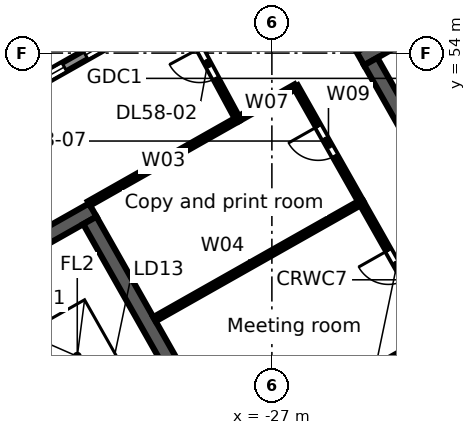
"""IFC4 building model, lengths in metres.
Left out: names, types, materials, properties, quantities, classifications, styles, units other than length and angle.
Written with IfcOpenShell. Run it as: python <this file> out.ifc"""

import sys

from ifc_helpers import new_model, si_unit, direction, frame, frame_2d, origin, place, context, subcontext, project, spatial, rectangle, extrude, element, fill, save


model = new_model("IFC4")
c1 = context("Model", 3, precision=1e-05, world=origin(), true_north=direction((0.0, 1.0)))
c2 = subcontext(c1, "Body", "Model", "MODEL_VIEW")
j1 = project(units=[si_unit("LENGTHUNIT", "METRE"), si_unit("PLANEANGLEUNIT", "RADIAN")], contexts=[c1])
p1 = place(None, origin())
s1 = spatial("IfcSite", under=j1, at=p1, CompositionType="ELEMENT")
p2 = place(p1, origin())
s2 = spatial("IfcBuilding", under=s1, at=p2, CompositionType="ELEMENT")
p3 = place(p2, frame((0.0, 0.0, 266.5)))
s3 = spatial("IfcBuildingStorey", under=s2, at=p3, CompositionType="ELEMENT", Elevation=266.5)
p4 = place(p3, frame((-58.732, 38.771, 0.0), z_axis=(0.0, 0.0, 1.0), x_axis=(0.870355615581, 0.492423702137, 0.0)))
e1 = element("IfcWall", 1, at=p4, inside=s3, PredefinedType="STANDARD", context=c2, shape_type="SweptSolid", body=[
    extrude(rectangle(XDim=64.052, YDim=0.25, at=frame_2d((32.026, 0.0))), origin(), (0.0, 0.0, 1.0), 3.52),
])
p5 = place(p4, frame((61.259, 0.0, 0.8)))
e2 = element("IfcOpeningElement", 2, at=p5, cuts=e1, PredefinedType="OPENING", context=c2, shape_type="SweptSolid", body=[
    extrude(rectangle(XDim=2.4, YDim=2.2, at=frame_2d((1.2, 1.1))), frame((0.0, 0.135, 0.0), z_axis=(0.0, -1.0, 0.0), x_axis=(1.0, 0.0, 0.0)), (0.0, 0.0, 1.0), 0.27),
])
p6 = place(p4, frame((58.216, 0.0, 0.8)))
e3 = element("IfcOpeningElement", 3, at=p6, cuts=e1, PredefinedType="OPENING", context=c2, shape_type="SweptSolid", body=[
    extrude(rectangle(XDim=2.4, YDim=2.2, at=frame_2d((1.2, 1.1))), frame((0.0, 0.135, 0.0), z_axis=(0.0, -1.0, 0.0), x_axis=(1.0, 0.0, 0.0)), (0.0, 0.0, 1.0), 0.27),
])
p7 = place(p4, frame((55.173, 0.0, 0.8)))
e4 = element("IfcOpeningElement", 4, at=p7, cuts=e1, PredefinedType="OPENING", context=c2, shape_type="SweptSolid", body=[
    extrude(rectangle(XDim=2.4, YDim=2.2, at=frame_2d((1.2, 1.1))), frame((0.0, 0.135, 0.0), z_axis=(0.0, -1.0, 0.0), x_axis=(1.0, 0.0, 0.0)), (0.0, 0.0, 1.0), 0.27),
])
p8 = place(p4, frame((52.129, 0.0, 0.8)))
e5 = element("IfcOpeningElement", 5, at=p8, cuts=e1, PredefinedType="OPENING", context=c2, shape_type="SweptSolid", body=[
    extrude(rectangle(XDim=2.4, YDim=2.2, at=frame_2d((1.2, 1.1))), frame((0.0, 0.135, 0.0), z_axis=(0.0, -1.0, 0.0), x_axis=(1.0, 0.0, 0.0)), (0.0, 0.0, 1.0), 0.27),
])
p9 = place(p4, frame((49.086, 0.0, 0.8)))
e6 = element("IfcOpeningElement", 6, at=p9, cuts=e1, PredefinedType="OPENING", context=c2, shape_type="SweptSolid", body=[
    extrude(rectangle(XDim=2.4, YDim=2.2, at=frame_2d((1.2, 1.1))), frame((0.0, 0.135, 0.0), z_axis=(0.0, -1.0, 0.0), x_axis=(1.0, 0.0, 0.0)), (0.0, 0.0, 1.0), 0.27),
])
p10 = place(p4, frame((46.043, 0.0, 0.8)))
e7 = element("IfcOpeningElement", 7, at=p10, cuts=e1, PredefinedType="OPENING", context=c2, shape_type="SweptSolid", body=[
    extrude(rectangle(XDim=2.4, YDim=2.2, at=frame_2d((1.2, 1.1))), frame((0.0, 0.135, 0.0), z_axis=(0.0, -1.0, 0.0), x_axis=(1.0, 0.0, 0.0)), (0.0, 0.0, 1.0), 0.27),
])
p11 = place(p4, frame((43.0, 0.0, 0.8)))
e8 = element("IfcOpeningElement", 8, at=p11, cuts=e1, PredefinedType="OPENING", context=c2, shape_type="SweptSolid", body=[
    extrude(rectangle(XDim=2.4, YDim=2.2, at=frame_2d((1.2, 1.1))), frame((0.0, 0.135, 0.0), z_axis=(0.0, -1.0, 0.0), x_axis=(1.0, 0.0, 0.0)), (0.0, 0.0, 1.0), 0.27),
])
p12 = place(p4, frame((39.956, 0.0, 0.8)))
e9 = element("IfcOpeningElement", 9, at=p12, cuts=e1, PredefinedType="OPENING", context=c2, shape_type="SweptSolid", body=[
    extrude(rectangle(XDim=2.4, YDim=2.2, at=frame_2d((1.2, 1.1))), frame((0.0, 0.135, 0.0), z_axis=(0.0, -1.0, 0.0), x_axis=(1.0, 0.0, 0.0)), (0.0, 0.0, 1.0), 0.27),
])
p13 = place(p4, frame((36.913, 0.0, 0.8)))
e10 = element("IfcOpeningElement", 10, at=p13, cuts=e1, PredefinedType="OPENING", context=c2, shape_type="SweptSolid", body=[
    extrude(rectangle(XDim=2.4, YDim=2.2, at=frame_2d((1.2, 1.1))), frame((0.0, 0.135, 0.0), z_axis=(0.0, -1.0, 0.0), x_axis=(1.0, 0.0, 0.0)), (0.0, 0.0, 1.0), 0.27),
])
p14 = place(p4, frame((33.87, 0.0, 0.8)))
e11 = element("IfcOpeningElement", 11, at=p14, cuts=e1, PredefinedType="OPENING", context=c2, shape_type="SweptSolid", body=[
    extrude(rectangle(XDim=2.4, YDim=2.2, at=frame_2d((1.2, 1.1))), frame((0.0, 0.135, 0.0), z_axis=(0.0, -1.0, 0.0), x_axis=(1.0, 0.0, 0.0)), (0.0, 0.0, 1.0), 0.27),
])
p15 = place(p4, frame((30.826, 0.0, 0.8)))
e12 = element("IfcOpeningElement", 12, at=p15, cuts=e1, PredefinedType="OPENING", context=c2, shape_type="SweptSolid", body=[
    extrude(rectangle(XDim=2.4, YDim=2.2, at=frame_2d((1.2, 1.1))), frame((0.0, 0.135, 0.0), z_axis=(0.0, -1.0, 0.0), x_axis=(1.0, 0.0, 0.0)), (0.0, 0.0, 1.0), 0.27),
])
p16 = place(p4, frame((27.783, 0.0, 0.8)))
e13 = element("IfcOpeningElement", 13, at=p16, cuts=e1, PredefinedType="OPENING", context=c2, shape_type="SweptSolid", body=[
    extrude(rectangle(XDim=2.4, YDim=2.2, at=frame_2d((1.2, 1.1))), frame((0.0, 0.135, 0.0), z_axis=(0.0, -1.0, 0.0), x_axis=(1.0, 0.0, 0.0)), (0.0, 0.0, 1.0), 0.27),
])
p17 = place(p4, frame((24.74, 0.0, 0.8)))
e14 = element("IfcOpeningElement", 14, at=p17, cuts=e1, PredefinedType="OPENING", context=c2, shape_type="SweptSolid", body=[
    extrude(rectangle(XDim=2.4, YDim=2.2, at=frame_2d((1.2, 1.1))), frame((0.0, 0.135, 0.0), z_axis=(0.0, -1.0, 0.0), x_axis=(1.0, 0.0, 0.0)), (0.0, 0.0, 1.0), 0.27),
])
p18 = place(p4, frame((21.696, 0.0, 0.8)))
e15 = element("IfcOpeningElement", 15, at=p18, cuts=e1, PredefinedType="OPENING", context=c2, shape_type="SweptSolid", body=[
    extrude(rectangle(XDim=2.4, YDim=2.2, at=frame_2d((1.2, 1.1))), frame((0.0, 0.135, 0.0), z_axis=(0.0, -1.0, 0.0), x_axis=(1.0, 0.0, 0.0)), (0.0, 0.0, 1.0), 0.27),
])
p19 = place(p4, frame((18.653, 0.0, 0.8)))
e16 = element("IfcOpeningElement", 16, at=p19, cuts=e1, PredefinedType="OPENING", context=c2, shape_type="SweptSolid", body=[
    extrude(rectangle(XDim=2.4, YDim=2.2, at=frame_2d((1.2, 1.1))), frame((0.0, 0.135, 0.0), z_axis=(0.0, -1.0, 0.0), x_axis=(1.0, 0.0, 0.0)), (0.0, 0.0, 1.0), 0.27),
])
p20 = place(p4, frame((15.61, 0.0, 0.8)))
e17 = element("IfcOpeningElement", 17, at=p20, cuts=e1, PredefinedType="OPENING", context=c2, shape_type="SweptSolid", body=[
    extrude(rectangle(XDim=2.4, YDim=2.2, at=frame_2d((1.2, 1.1))), frame((0.0, 0.135, 0.0), z_axis=(0.0, -1.0, 0.0), x_axis=(1.0, 0.0, 0.0)), (0.0, 0.0, 1.0), 0.27),
])
p21 = place(p4, frame((12.567, 0.0, 0.8)))
e18 = element("IfcOpeningElement", 18, at=p21, cuts=e1, PredefinedType="OPENING", context=c2, shape_type="SweptSolid", body=[
    extrude(rectangle(XDim=2.4, YDim=2.2, at=frame_2d((1.2, 1.1))), frame((0.0, 0.135, 0.0), z_axis=(0.0, -1.0, 0.0), x_axis=(1.0, 0.0, 0.0)), (0.0, 0.0, 1.0), 0.27),
])
p22 = place(p4, frame((9.523, 0.0, 0.8)))
e19 = element("IfcOpeningElement", 19, at=p22, cuts=e1, PredefinedType="OPENING", context=c2, shape_type="SweptSolid", body=[
    extrude(rectangle(XDim=2.4, YDim=2.2, at=frame_2d((1.2, 1.1))), frame((0.0, 0.135, 0.0), z_axis=(0.0, -1.0, 0.0), x_axis=(1.0, 0.0, 0.0)), (0.0, 0.0, 1.0), 0.27),
])
p23 = place(p4, frame((6.48, 0.0, 0.8)))
e20 = element("IfcOpeningElement", 20, at=p23, cuts=e1, PredefinedType="OPENING", context=c2, shape_type="SweptSolid", body=[
    extrude(rectangle(XDim=2.4, YDim=2.2, at=frame_2d((1.2, 1.1))), frame((0.0, 0.135, 0.0), z_axis=(0.0, -1.0, 0.0), x_axis=(1.0, 0.0, 0.0)), (0.0, 0.0, 1.0), 0.27),
])
p24 = place(p4, frame((3.437, 0.0, 0.8)))
e21 = element("IfcOpeningElement", 21, at=p24, cuts=e1, PredefinedType="OPENING", context=c2, shape_type="SweptSolid", body=[
    extrude(rectangle(XDim=2.4, YDim=2.2, at=frame_2d((1.2, 1.1))), frame((0.0, 0.135, 0.0), z_axis=(0.0, -1.0, 0.0), x_axis=(1.0, 0.0, 0.0)), (0.0, 0.0, 1.0), 0.27),
])
p25 = place(p4, frame((0.393, 0.0, 0.8)))
e22 = element("IfcOpeningElement", 22, at=p25, cuts=e1, PredefinedType="OPENING", context=c2, shape_type="SweptSolid", body=[
    extrude(rectangle(XDim=2.4, YDim=2.2, at=frame_2d((1.2, 1.1))), frame((0.0, 0.135, 0.0), z_axis=(0.0, -1.0, 0.0), x_axis=(1.0, 0.0, 0.0)), (0.0, 0.0, 1.0), 0.27),
])
p26 = place(p3, frame((-3.017, 46.293, 0.0), z_axis=(0.0, 0.0, 1.0), x_axis=(-0.870355474887, -0.492423950812, 0.0)))
e23 = element("IfcWall", 23, at=p26, inside=s3, PredefinedType="STANDARD", context=c2, shape_type="SweptSolid", body=[
    extrude(rectangle(XDim=40.34, YDim=0.25, at=frame_2d((20.17, 0.0))), origin(), (0.0, 0.0, 1.0), 3.52),
])
p27 = place(p26, frame((37.428, 0.0, 0.8)))
e24 = element("IfcOpeningElement", 24, at=p27, cuts=e23, PredefinedType="OPENING", context=c2, shape_type="SweptSolid", body=[
    extrude(rectangle(XDim=2.4, YDim=2.2, at=frame_2d((1.2, 1.1))), frame((0.0, 0.135, 0.0), z_axis=(0.0, -1.0, 0.0), x_axis=(1.0, 0.0, 0.0)), (0.0, 0.0, 1.0), 0.27),
])
p28 = place(p26, frame((34.372, 0.0, 0.0)))
e25 = element("IfcOpeningElement", 25, at=p28, cuts=e23, PredefinedType="OPENING", context=c2, shape_type="SweptSolid", body=[
    extrude(rectangle(XDim=1.8, YDim=2.4, at=frame_2d((0.9, 1.2))), frame((0.0, 0.135, 0.0), z_axis=(0.0, -1.0, 0.0), x_axis=(1.0, 0.0, 0.0)), (0.0, 0.0, 1.0), 0.27),
])
p29 = place(p26, frame((30.716, 0.0, 0.8)))
e26 = element("IfcOpeningElement", 26, at=p29, cuts=e23, PredefinedType="OPENING", context=c2, shape_type="SweptSolid", body=[
    extrude(rectangle(XDim=2.4, YDim=2.2, at=frame_2d((1.2, 1.1))), frame((0.0, 0.135, 0.0), z_axis=(0.0, -1.0, 0.0), x_axis=(1.0, 0.0, 0.0)), (0.0, 0.0, 1.0), 0.27),
])
p30 = place(p26, frame((27.36, 0.0, 0.8)))
e27 = element("IfcOpeningElement", 27, at=p30, cuts=e23, PredefinedType="OPENING", context=c2, shape_type="SweptSolid", body=[
    extrude(rectangle(XDim=2.4, YDim=2.2, at=frame_2d((1.2, 1.1))), frame((0.0, 0.135, 0.0), z_axis=(0.0, -1.0, 0.0), x_axis=(1.0, 0.0, 0.0)), (0.0, 0.0, 1.0), 0.27),
])
p31 = place(p26, frame((24.304, 0.0, 0.0)))
e28 = element("IfcOpeningElement", 28, at=p31, cuts=e23, PredefinedType="OPENING", context=c2, shape_type="SweptSolid", body=[
    extrude(rectangle(XDim=1.8, YDim=2.4, at=frame_2d((0.9, 1.2))), frame((0.0, 0.135, 0.0), z_axis=(0.0, -1.0, 0.0), x_axis=(1.0, 0.0, 0.0)), (0.0, 0.0, 1.0), 0.27),
])
p32 = place(p26, frame((20.648, 0.0, 0.8)))
e29 = element("IfcOpeningElement", 29, at=p32, cuts=e23, PredefinedType="OPENING", context=c2, shape_type="SweptSolid", body=[
    extrude(rectangle(XDim=2.4, YDim=2.2, at=frame_2d((1.2, 1.1))), frame((0.0, 0.135, 0.0), z_axis=(0.0, -1.0, 0.0), x_axis=(1.0, 0.0, 0.0)), (0.0, 0.0, 1.0), 0.27),
])
p33 = place(p26, frame((17.292, 0.0, 0.8)))
e30 = element("IfcOpeningElement", 30, at=p33, cuts=e23, PredefinedType="OPENING", context=c2, shape_type="SweptSolid", body=[
    extrude(rectangle(XDim=2.4, YDim=2.2, at=frame_2d((1.2, 1.1))), frame((0.0, 0.135, 0.0), z_axis=(0.0, -1.0, 0.0), x_axis=(1.0, 0.0, 0.0)), (0.0, 0.0, 1.0), 0.27),
])
p34 = place(p26, frame((14.236, 0.0, 0.0)))
e31 = element("IfcOpeningElement", 31, at=p34, cuts=e23, PredefinedType="OPENING", context=c2, shape_type="SweptSolid", body=[
    extrude(rectangle(XDim=1.8, YDim=2.4, at=frame_2d((0.9, 1.2))), frame((0.0, 0.135, 0.0), z_axis=(0.0, -1.0, 0.0), x_axis=(1.0, 0.0, 0.0)), (0.0, 0.0, 1.0), 0.27),
])
p35 = place(p26, frame((10.58, 0.0, 0.8)))
e32 = element("IfcOpeningElement", 32, at=p35, cuts=e23, PredefinedType="OPENING", context=c2, shape_type="SweptSolid", body=[
    extrude(rectangle(XDim=2.4, YDim=2.2, at=frame_2d((1.2, 1.1))), frame((0.0, 0.135, 0.0), z_axis=(0.0, -1.0, 0.0), x_axis=(1.0, 0.0, 0.0)), (0.0, 0.0, 1.0), 0.27),
])
p36 = place(p26, frame((7.224, 0.0, 0.8)))
e33 = element("IfcOpeningElement", 33, at=p36, cuts=e23, PredefinedType="OPENING", context=c2, shape_type="SweptSolid", body=[
    extrude(rectangle(XDim=2.4, YDim=2.2, at=frame_2d((1.2, 1.1))), frame((0.0, 0.135, 0.0), z_axis=(0.0, -1.0, 0.0), x_axis=(1.0, 0.0, 0.0)), (0.0, 0.0, 1.0), 0.27),
])
p37 = place(p26, frame((4.168, 0.0, 0.0)))
e34 = element("IfcOpeningElement", 34, at=p37, cuts=e23, PredefinedType="OPENING", context=c2, shape_type="SweptSolid", body=[
    extrude(rectangle(XDim=1.8, YDim=2.4, at=frame_2d((0.9, 1.2))), frame((0.0, 0.135, 0.0), z_axis=(0.0, -1.0, 0.0), x_axis=(1.0, 0.0, 0.0)), (0.0, 0.0, 1.0), 0.27),
])
p38 = place(p26, frame((0.512, 0.0, 0.8)))
e35 = element("IfcOpeningElement", 35, at=p38, cuts=e23, PredefinedType="OPENING", context=c2, shape_type="SweptSolid", body=[
    extrude(rectangle(XDim=2.4, YDim=2.2, at=frame_2d((1.2, 1.1))), frame((0.0, 0.135, 0.0), z_axis=(0.0, -1.0, 0.0), x_axis=(1.0, 0.0, 0.0)), (0.0, 0.0, 1.0), 0.27),
])
p39 = place(p3, frame((-46.51, 41.499, 0.0), z_axis=(0.0, 0.0, 1.0), x_axis=(0.870356271124, 0.492422543467, 0.0)))
e36 = element("IfcWall", 36, at=p39, inside=s3, PredefinedType="SOLIDWALL", context=c2, shape_type="SweptSolid", body=[
    extrude(rectangle(XDim=17.0, YDim=0.4, at=frame_2d((8.5, 0.0))), origin(), (0.0, 0.0, 1.0), 3.52),
])
p40 = place(p3, frame((-31.79, 49.597, 0.0), z_axis=(0.0, 0.0, 1.0), x_axis=(0.492421663121, -0.870356769198, 0.0)))
e37 = element("IfcWall", 37, at=p40, inside=s3, PredefinedType="SOLIDWALL", context=c2, shape_type="SweptSolid", body=[
    extrude(rectangle(XDim=13.2, YDim=0.4, at=frame_2d((6.6, 0.0))), origin(), (0.0, 0.0, 1.0), 3.52),
])
p41 = place(p3, frame((-24.672, 53.854, 0.0), z_axis=(0.0, 0.0, 1.0), x_axis=(0.870353598469, 0.492427267353, 0.0)))
e38 = element("IfcWall", 38, at=p41, inside=s3, PredefinedType="SOLIDWALL", context=c2, shape_type="SweptSolid", body=[
    extrude(rectangle(XDim=15.0, YDim=0.4, at=frame_2d((7.5, 0.0))), origin(), (0.0, 0.0, 1.0), 3.52),
])
p42 = place(p3, frame((-24.4, 53.779, 0.0), z_axis=(0.0, 0.0, 1.0), x_axis=(0.492421663121, -0.870356769198, 0.0)))
e39 = element("IfcWall", 39, at=p42, inside=s3, PredefinedType="SOLIDWALL", context=c2, shape_type="SweptSolid", body=[
    extrude(rectangle(XDim=13.2, YDim=0.4, at=frame_2d((6.6, 0.0))), origin(), (0.0, 0.0, 1.0), 3.52),
])
p43 = place(p3, frame((-31.812, 50.044, 0.0), z_axis=(0.0, 0.0, 1.0), x_axis=(0.870309075431, 0.492505952474, 0.0)))
e40 = element("IfcWall", 40, at=p43, inside=s3, PredefinedType="PARTITIONING", context=c2, shape_type="SweptSolid", body=[
    extrude(rectangle(XDim=4.5, YDim=0.125, at=frame_2d((2.25, 0.0))), origin(), (0.0, 0.0, 1.0), 3.52),
])
p44 = place(p3, frame((-30.089, 46.998, 0.0), z_axis=(0.0, 0.0, 1.0), x_axis=(0.870424575418, 0.492301796167, 0.0)))
e41 = element("IfcWall", 41, at=p44, inside=s3, PredefinedType="PARTITIONING", context=c2, shape_type="SweptSolid", body=[
    extrude(rectangle(XDim=6.25, YDim=0.125, at=frame_2d((3.125, 0.0))), origin(), (0.0, 0.0, 1.0), 3.52),
])
p45 = place(p3, frame((-29.474, 55.181, 0.0), z_axis=(0.0, 0.0, 1.0), x_axis=(0.475344759365, -0.879799613403, 0.0)))
e42 = element("IfcWall", 42, at=p45, inside=s3, PredefinedType="PARTITIONING", context=c2, shape_type="SweptSolid", body=[
    extrude(rectangle(XDim=3.32, YDim=0.125, at=frame_2d((1.66, 0.0))), origin(), (0.0, 0.0, 1.0), 2.888),
])
p46 = place(p45, frame((1.2, 0.0, 0.0)))
e43 = element("IfcOpeningElement", 43, at=p46, cuts=e42, PredefinedType="OPENING", context=c2, shape_type="SweptSolid", body=[
    extrude(rectangle(XDim=0.9, YDim=2.1, at=frame_2d((0.45, 1.05))), frame((0.0, 0.073, 0.0), z_axis=(0.0, -1.0, 0.0), x_axis=(1.0, 0.0, 0.0)), (0.0, 0.0, 1.0), 0.145),
])
p47 = place(p3, frame((-28.119, 43.516, 0.0), z_axis=(0.0, 0.0, 1.0), x_axis=(0.870310250913, 0.49250387527, 0.0)))
e44 = element("IfcWall", 44, at=p47, inside=s3, PredefinedType="PARTITIONING", context=c2, shape_type="SweptSolid", body=[
    extrude(rectangle(XDim=6.25, YDim=0.15, at=frame_2d((3.125, 0.0))), origin(), (0.0, 0.0, 1.0), 2.792),
])
p48 = place(p3, frame((-27.896, 52.26, 0.0), z_axis=(0.0, 0.0, 1.0), x_axis=(0.870253469837, 0.492604200384, 0.0)))
e45 = element("IfcWall", 45, at=p48, inside=s3, PredefinedType="PARTITIONING", context=c2, shape_type="SweptSolid", body=[
    extrude(rectangle(XDim=1.75, YDim=0.125, at=frame_2d((0.875, 0.0))), origin(), (0.0, 0.0, 1.0), 3.52),
])
p49 = place(p3, frame((-26.373, 53.122, 0.0), z_axis=(0.0, 0.0, 1.0), x_axis=(0.492454723656, -0.870338063714, 0.0)))
e46 = element("IfcWall", 46, at=p49, inside=s3, PredefinedType="PARTITIONING", context=c2, shape_type="SweptSolid", body=[
    extrude(rectangle(XDim=3.501, YDim=0.125, at=frame_2d((1.75, 0.0))), origin(), (0.0, 0.0, 1.0), 3.52),
])
p50 = place(p49, frame((1.2, 0.0, 0.0)))
e47 = element("IfcOpeningElement", 47, at=p50, cuts=e46, PredefinedType="OPENING", context=c2, shape_type="SweptSolid", body=[
    extrude(rectangle(XDim=0.9, YDim=2.1, at=frame_2d((0.45, 1.05))), frame((0.0, 0.073, 0.0), z_axis=(0.0, -1.0, 0.0), x_axis=(1.0, 0.0, 0.0)), (0.0, 0.0, 1.0), 0.145),
])
p51 = place(p3, frame((-24.649, 50.075, 0.0), z_axis=(0.0, 0.0, 1.0), x_axis=(0.492340861121, -0.870402479587, 0.0)))
e48 = element("IfcWall", 48, at=p51, inside=s3, PredefinedType="PARTITIONING", context=c2, shape_type="SweptSolid", body=[
    extrude(rectangle(XDim=3.999, YDim=0.125, at=frame_2d((2.0, 0.0))), origin(), (0.0, 0.0, 1.0), 2.792),
])
p52 = place(p51, frame((1.45, 0.0, 0.0)))
e49 = element("IfcOpeningElement", 49, at=p52, cuts=e48, PredefinedType="OPENING", context=c2, shape_type="SweptSolid", body=[
    extrude(rectangle(XDim=0.9, YDim=2.1, at=frame_2d((0.45, 1.05))), frame((0.0, 0.073, 0.0), z_axis=(0.0, -1.0, 0.0), x_axis=(1.0, 0.0, 0.0)), (0.0, 0.0, 1.0), 0.145),
])
p53 = place(p15, origin())
e50 = element("IfcWindow", 50, at=p53, inside=s3, PartitioningType="SINGLE_PANEL", PredefinedType="WINDOW", context=c2, shape_type="SweptSolid", body=[
    extrude(rectangle(XDim=2.4, YDim=2.2, at=frame_2d((1.2, 1.1))), frame((0.0, 0.03, 0.0), z_axis=(0.0, -1.0, 0.0), x_axis=(1.0, 0.0, 0.0)), (0.0, 0.0, 1.0), 0.06),
])
fill(e12, e50)
p54 = place(p16, origin())
e51 = element("IfcWindow", 51, at=p54, inside=s3, PartitioningType="SINGLE_PANEL", PredefinedType="WINDOW", context=c2, shape_type="SweptSolid", body=[
    extrude(rectangle(XDim=2.4, YDim=2.2, at=frame_2d((1.2, 1.1))), frame((0.0, 0.03, 0.0), z_axis=(0.0, -1.0, 0.0), x_axis=(1.0, 0.0, 0.0)), (0.0, 0.0, 1.0), 0.06),
])
fill(e13, e51)
p55 = place(p46, frame((0.9, 0.0, 0.0), z_axis=(0.0, 0.0, 1.0), x_axis=(-1.0, 0.0, 0.0)))
e52 = element("IfcDoor", 52, at=p55, inside=s3, OperationType="SINGLE_SWING_RIGHT", PredefinedType="DOOR", context=c2, shape_type="SweptSolid", body=[
    extrude(rectangle(XDim=0.9, YDim=2.1, at=frame_2d((0.45, 1.05))), frame((0.0, 0.025, 0.0), z_axis=(0.0, -1.0, 0.0), x_axis=(1.0, 0.0, 0.0)), (0.0, 0.0, 1.0), 0.05),
])
fill(e43, e52)
p56 = place(p52, frame((0.9, 0.0, 0.0), z_axis=(0.0, 0.0, 1.0), x_axis=(-1.0, 0.0, 0.0)))
e53 = element("IfcDoor", 53, at=p56, inside=s3, OperationType="SINGLE_SWING_RIGHT", PredefinedType="DOOR", context=c2, shape_type="SweptSolid", body=[
    extrude(rectangle(XDim=0.9, YDim=2.1, at=frame_2d((0.45, 1.05))), frame((0.0, 0.025, 0.0), z_axis=(0.0, -1.0, 0.0), x_axis=(1.0, 0.0, 0.0)), (0.0, 0.0, 1.0), 0.05),
])
fill(e49, e53)
p57 = place(p50, frame((0.9, 0.0, 0.0), z_axis=(0.0, 0.0, 1.0), x_axis=(-1.0, 0.0, 0.0)))
e54 = element("IfcDoor", 54, at=p57, inside=s3, OperationType="SINGLE_SWING_RIGHT", PredefinedType="DOOR", context=c2, shape_type="SweptSolid", body=[
    extrude(rectangle(XDim=0.9, YDim=2.1, at=frame_2d((0.45, 1.05))), frame((0.0, 0.025, 0.0), z_axis=(0.0, -1.0, 0.0), x_axis=(1.0, 0.0, 0.0)), (0.0, 0.0, 1.0), 0.05),
])
fill(e47, e54)
save(model, sys.argv[1])
